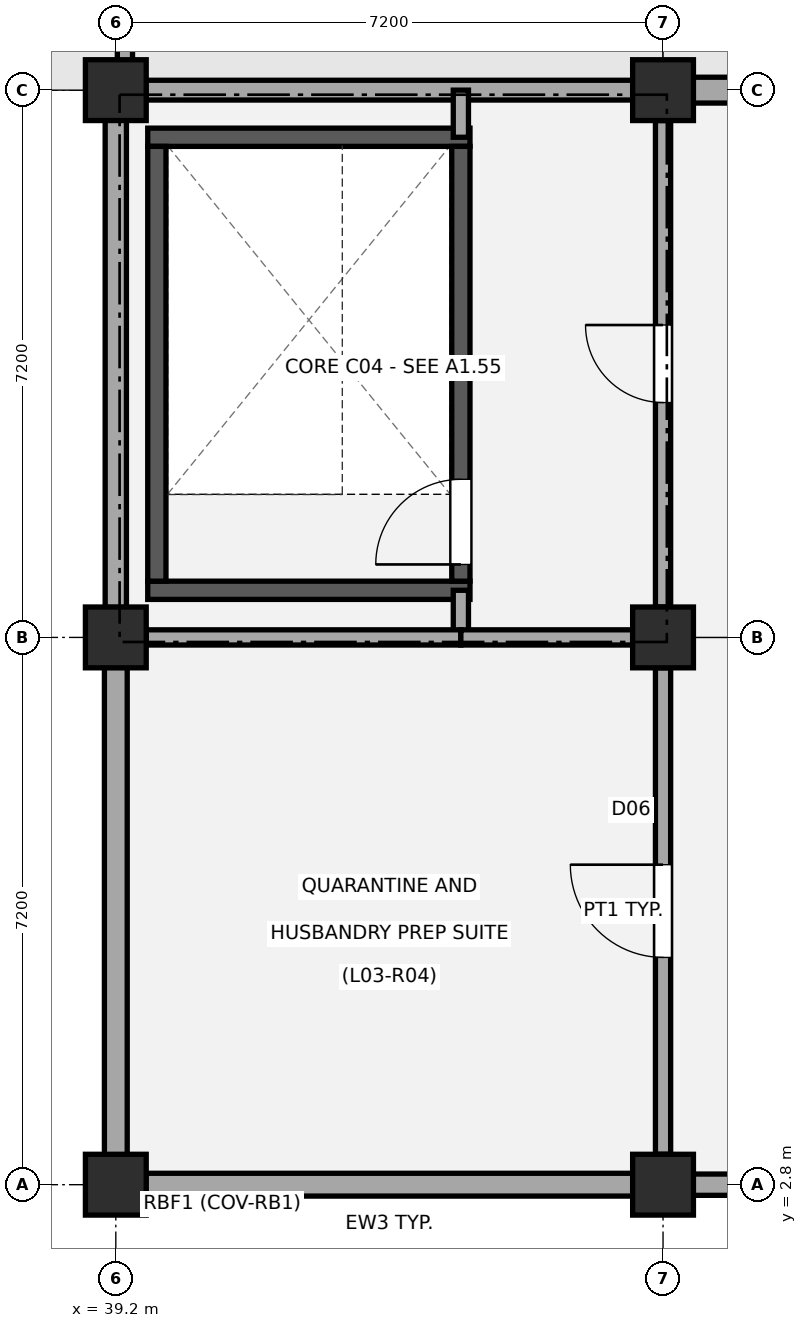
"""IFC4 building model, lengths in metres.
Left out: names, types, materials, properties, quantities, classifications, styles, units other than length and angle.
Written with IfcOpenShell. Run it as: python <this file> out.ifc"""

import sys

from ifc_helpers import new_model, si_unit, direction, frame, frame_2d, origin, origin_2d, place, context, subcontext, project, spatial, rectangle, extrude, element, fill, save


model = new_model("IFC4")
c1 = context("Model", 3, precision=1e-05, world=origin(), true_north=direction((0.0, 1.0)))
c2 = subcontext(c1, "Body", "Model", "MODEL_VIEW")
j1 = project(units=[si_unit("LENGTHUNIT", "METRE"), si_unit("PLANEANGLEUNIT", "RADIAN")], contexts=[c1])
p1 = place(None, origin())
s1 = spatial("IfcSite", under=j1, at=p1, CompositionType="ELEMENT")
p2 = place(p1, origin())
s2 = spatial("IfcBuilding", under=s1, at=p2, CompositionType="ELEMENT")
p3 = place(p2, frame((0.0, 0.0, 13.5)))
s3 = spatial("IfcBuildingStorey", under=s2, at=p3, CompositionType="ELEMENT", Elevation=13.5)
for number, where, z_axis, x_axis in (
    (1, (39.2, 2.8, 0.0), (0.0, 0.0, 1.0), (1.0, 0.0, 0.0)),
    (2, (39.2, 10.0, 0.0), (0.0, 0.0, 1.0), (1.0, 0.0, 0.0)),
    (3, (39.2, 17.2, 0.0), (0.0, 0.0, 1.0), (1.0, 0.0, 0.0)),
    (4, (46.4, 2.8, 0.0), (0.0, 0.0, 1.0), (1.0, 0.0, 0.0)),
    (5, (46.4, 10.0, 0.0), (0.0, 0.0, 1.0), (1.0, 0.0, 0.0)),
    (6, (46.4, 17.2, 0.0), (0.0, 0.0, 1.0), (1.0, 0.0, 0.0)),
):
    element("IfcColumn", number, at=place(p3, frame(where, z_axis=z_axis, x_axis=x_axis)), inside=s3, PredefinedType="COLUMN", context=c2, shape_type="SweptSolid", body=[
        extrude(rectangle(XDim=0.8, YDim=0.8, at=origin_2d()), origin(), (0.0, 0.0, 1.0), 4.14),
    ])
p4 = place(p3, frame((46.005, 2.8, 0.0), z_axis=(0.0, 0.0, 1.0), x_axis=(-1.0, 0.0, 0.0)))
e7 = element("IfcWall", 7, at=p4, inside=s3, PredefinedType="STANDARD", context=c2, shape_type="SweptSolid", body=[
    extrude(rectangle(XDim=6.41, YDim=0.3, at=frame_2d((3.205, 0.0))), origin(), (0.0, 0.0, 1.0), 3.3),
])
p5 = place(p3, frame((39.595, 17.2, 0.0), z_axis=(0.0, 0.0, 1.0), x_axis=(1.0, 0.0, 0.0)))
e8 = element("IfcWall", 8, at=p5, inside=s3, PredefinedType="STANDARD", context=c2, shape_type="SweptSolid", body=[
    extrude(rectangle(XDim=6.41, YDim=0.26, at=frame_2d((3.205, 0.0))), origin(), (0.0, 0.0, 1.0), 3.3),
])
p6 = place(p3, frame((53.205, 2.8, 0.0), z_axis=(0.0, 0.0, 1.0), x_axis=(-1.0, 0.0, 0.0)))
e9 = element("IfcWall", 9, at=p6, inside=s3, PredefinedType="STANDARD", context=c2, shape_type="SweptSolid", body=[
    extrude(rectangle(XDim=6.41, YDim=0.28, at=frame_2d((3.205, 0.0))), origin(), (0.0, 0.0, 1.0), 3.3),
])
p7 = place(p3, frame((46.795, 17.2, 0.0), z_axis=(0.0, 0.0, 1.0), x_axis=(1.0, 0.0, 0.0)))
e10 = element("IfcWall", 10, at=p7, inside=s3, PredefinedType="STANDARD", context=c2, shape_type="SweptSolid", body=[
    extrude(rectangle(XDim=6.41, YDim=0.34, at=frame_2d((3.205, 0.0))), origin(), (0.0, 0.0, 1.0), 3.3),
])
p8 = place(p3, frame((39.2, 3.195, 0.0), z_axis=(0.0, 0.0, 1.0), x_axis=(0.0, 1.0, 0.0)))
e11 = element("IfcWall", 11, at=p8, inside=s3, PredefinedType="STANDARD", context=c2, shape_type="SweptSolid", body=[
    extrude(rectangle(XDim=6.41, YDim=0.3, at=frame_2d((3.205, 0.0))), origin(), (0.0, 0.0, 1.0), 3.3),
])
p9 = place(p3, frame((39.2, 10.395, 0.0), z_axis=(0.0, 0.0, 1.0), x_axis=(0.0, 1.0, 0.0)))
e12 = element("IfcWall", 12, at=p9, inside=s3, PredefinedType="STANDARD", context=c2, shape_type="SweptSolid", body=[
    extrude(rectangle(XDim=6.41, YDim=0.28, at=frame_2d((3.205, 0.0))), origin(), (0.0, 0.0, 1.0), 3.3),
])
p10 = place(p3, frame((39.32, 17.2, 0.0), z_axis=(0.0, 0.0, 1.0), x_axis=(0.0, 1.0, 0.0)))
e13 = element("IfcWall", 13, at=p10, inside=s3, PredefinedType="PARAPET", context=c2, shape_type="SweptSolid", body=[
    extrude(rectangle(XDim=7.2, YDim=0.2, at=frame_2d((3.6, 0.0))), origin(), (0.0, 0.0, 1.0), 0.72),
])
for number, where, z_axis, x_axis in (
    (14, (39.62, 10.62, 0.0), (0.0, 0.0, 1.0), (1.0, 0.0, 0.0)),
    (15, (39.62, 16.58, 0.0), (0.0, 0.0, 1.0), (1.0, 0.0, 0.0)),
):
    element("IfcWall", number, at=place(p3, frame(where, z_axis=z_axis, x_axis=x_axis)), inside=s3, PredefinedType="SHEAR", context=c2, shape_type="SweptSolid", body=[
        extrude(rectangle(XDim=4.24, YDim=0.24, at=frame_2d((2.12, 0.0))), origin(), (0.0, 0.0, 1.0), 3.86),
    ])
p11 = place(p3, frame((39.74, 10.74, 0.0), z_axis=(0.0, 0.0, 1.0), x_axis=(0.0, 1.0, 0.0)))
e16 = element("IfcWall", 16, at=p11, inside=s3, PredefinedType="SHEAR", context=c2, shape_type="SweptSolid", body=[
    extrude(rectangle(XDim=5.72, YDim=0.24, at=frame_2d((2.86, 0.0))), origin(), (0.0, 0.0, 1.0), 3.86),
])
p12 = place(p3, frame((43.74, 10.74, 0.0), z_axis=(0.0, 0.0, 1.0), x_axis=(0.0, 1.0, 0.0)))
e17 = element("IfcWall", 17, at=p12, inside=s3, PredefinedType="SHEAR", context=c2, shape_type="SweptSolid", body=[
    extrude(rectangle(XDim=5.72, YDim=0.24, at=frame_2d((2.86, 0.0))), origin(), (0.0, 0.0, 1.0), 3.86),
])
p13 = place(p12, frame((0.22, 0.0, 0.0)))
e18 = element("IfcOpeningElement", 18, at=p13, cuts=e17, PredefinedType="OPENING", context=c2, shape_type="SweptSolid", body=[
    extrude(rectangle(XDim=1.12, YDim=2.15, at=frame_2d((0.56, 1.075))), frame((0.0, 0.13, 0.0), z_axis=(0.0, -1.0, 0.0), x_axis=(1.0, 0.0, 0.0)), (0.0, 0.0, 1.0), 0.26),
])
p14 = place(p3, frame((43.74, 10.0, 0.0), z_axis=(0.0, 0.0, 1.0), x_axis=(0.0, 1.0, 0.0)))
e19 = element("IfcWall", 19, at=p14, inside=s3, PredefinedType="PARTITIONING", context=c2, shape_type="SweptSolid", body=[
    extrude(rectangle(XDim=0.62, YDim=0.2, at=frame_2d((0.31, 0.0))), origin(), (0.0, 0.0, 1.0), 3.2),
])
p15 = place(p3, frame((43.74, 16.58, 0.0), z_axis=(0.0, 0.0, 1.0), x_axis=(0.0, 1.0, 0.0)))
e20 = element("IfcWall", 20, at=p15, inside=s3, PredefinedType="PARTITIONING", context=c2, shape_type="SweptSolid", body=[
    extrude(rectangle(XDim=0.62, YDim=0.2, at=frame_2d((0.31, 0.0))), origin(), (0.0, 0.0, 1.0), 3.3),
])
p16 = place(p3, frame((46.4, 10.4, 0.0), z_axis=(0.0, 0.0, 1.0), x_axis=(0.0, 1.0, 0.0)))
e21 = element("IfcWall", 21, at=p16, inside=s3, PredefinedType="PARTITIONING", context=c2, shape_type="SweptSolid", body=[
    extrude(rectangle(XDim=6.4, YDim=0.2, at=frame_2d((3.2, 0.0))), origin(), (0.0, 0.0, 1.0), 3.25),
])
p17 = place(p16, frame((2.69, 0.0, 0.0)))
e22 = element("IfcOpeningElement", 22, at=p17, cuts=e21, PredefinedType="OPENING", context=c2, shape_type="SweptSolid", body=[
    extrude(rectangle(XDim=1.02, YDim=2.15, at=frame_2d((0.51, 1.075))), frame((0.0, 0.11, 0.0), z_axis=(0.0, -1.0, 0.0), x_axis=(1.0, 0.0, 0.0)), (0.0, 0.0, 1.0), 0.22),
])
p18 = place(p3, frame((39.6, 10.0, 0.0), z_axis=(0.0, 0.0, 1.0), x_axis=(1.0, 0.0, 0.0)))
e23 = element("IfcWall", 23, at=p18, inside=s3, PredefinedType="PARTITIONING", context=c2, shape_type="SweptSolid", body=[
    extrude(rectangle(XDim=4.14, YDim=0.2, at=frame_2d((2.07, 0.0))), origin(), (0.0, 0.0, 1.0), 3.2),
])
p19 = place(p3, frame((43.74, 10.0, 0.0), z_axis=(0.0, 0.0, 1.0), x_axis=(1.0, 0.0, 0.0)))
e24 = element("IfcWall", 24, at=p19, inside=s3, PredefinedType="PARTITIONING", context=c2, shape_type="SweptSolid", body=[
    extrude(rectangle(XDim=2.26, YDim=0.2, at=frame_2d((1.13, 0.0))), origin(), (0.0, 0.0, 1.0), 3.2),
])
p20 = place(p3, frame((46.4, 3.2, 0.0), z_axis=(0.0, 0.0, 1.0), x_axis=(0.0, 1.0, 0.0)))
e25 = element("IfcWall", 25, at=p20, inside=s3, PredefinedType="PARTITIONING", context=c2, shape_type="SweptSolid", body=[
    extrude(rectangle(XDim=6.4, YDim=0.2, at=frame_2d((3.2, 0.0))), origin(), (0.0, 0.0, 1.0), 3.2),
])
p21 = place(p20, frame((2.59, 0.0, 0.0)))
e26 = element("IfcOpeningElement", 26, at=p21, cuts=e25, PredefinedType="OPENING", context=c2, shape_type="SweptSolid", body=[
    extrude(rectangle(XDim=1.22, YDim=2.16, at=frame_2d((0.61, 1.08))), frame((0.0, 0.11, 0.0), z_axis=(0.0, -1.0, 0.0), x_axis=(1.0, 0.0, 0.0)), (0.0, 0.0, 1.0), 0.22),
])
p22 = place(p13, origin())
e27 = element("IfcDoor", 27, at=p22, inside=s3, OperationType="SINGLE_SWING_LEFT", PredefinedType="DOOR", context=c2, shape_type="SweptSolid", body=[
    extrude(rectangle(XDim=1.12, YDim=2.15, at=frame_2d((0.56, 1.075))), frame((0.0, 0.025, 0.0), z_axis=(0.0, -1.0, 0.0), x_axis=(1.0, 0.0, 0.0)), (0.0, 0.0, 1.0), 0.05),
])
fill(e18, e27)
p23 = place(p17, origin())
e28 = element("IfcDoor", 28, at=p23, inside=s3, OperationType="SINGLE_SWING_RIGHT", PredefinedType="DOOR", context=c2, shape_type="SweptSolid", body=[
    extrude(rectangle(XDim=1.02, YDim=2.15, at=frame_2d((0.51, 1.075))), frame((0.0, 0.025, 0.0), z_axis=(0.0, -1.0, 0.0), x_axis=(1.0, 0.0, 0.0)), (0.0, 0.0, 1.0), 0.05),
])
fill(e22, e28)
p24 = place(p21, origin())
e29 = element("IfcDoor", 29, at=p24, inside=s3, OperationType="SINGLE_SWING_RIGHT", PredefinedType="DOOR", context=c2, shape_type="SweptSolid", body=[
    extrude(rectangle(XDim=1.22, YDim=2.16, at=frame_2d((0.61, 1.08))), frame((0.0, 0.025, 0.0), z_axis=(0.0, -1.0, 0.0), x_axis=(1.0, 0.0, 0.0)), (0.0, 0.0, 1.0), 0.05),
])
fill(e26, e29)
save(model, sys.argv[1])
